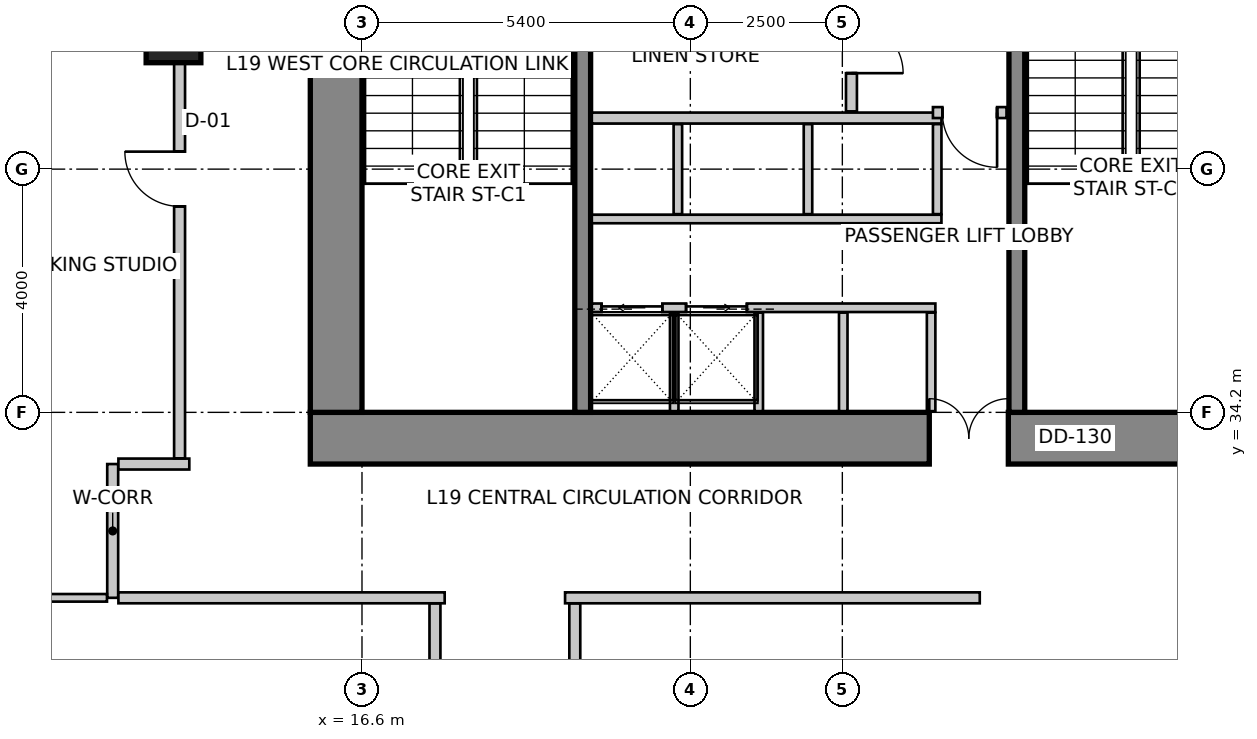
"""IFC4 building model, lengths in metres.
Left out: names, types, materials, properties, quantities, classifications, styles, units other than length and angle.
Written with IfcOpenShell. Run it as: python <this file> out.ifc"""

import sys

from ifc_helpers import new_model, si_unit, direction, frame, frame_2d, origin, origin_2d, place, context, subcontext, project, spatial, rectangle, extrude, source, transform, mapped, element, fill, save


model = new_model("IFC4")
c1 = context("Model", 3, precision=1e-05, world=origin(), true_north=direction((0.0, 1.0)))
c2 = subcontext(c1, "Body", "Model", "MODEL_VIEW")
j1 = project(units=[si_unit("LENGTHUNIT", "METRE"), si_unit("PLANEANGLEUNIT", "RADIAN")], contexts=[c1])
p1 = place(None, origin())
s1 = spatial("IfcSite", under=j1, at=p1, CompositionType="ELEMENT")
p2 = place(p1, origin())
s2 = spatial("IfcBuilding", under=s1, at=p2, CompositionType="ELEMENT")
p3 = place(p2, frame((0.0, 0.0, 79.0)))
s3 = spatial("IfcBuildingStorey", under=s2, at=p3, CompositionType="ELEMENT", Elevation=79.0)
p4 = place(p3, frame((15.75, 33.775, 0.0), z_axis=(0.0, 0.0, 1.0), x_axis=(1.0, 0.0, 0.0)))
e1 = element("IfcWall", 1, at=p4, inside=s3, PredefinedType="SHEAR", context=c2, shape_type="SweptSolid", body=[
    extrude(rectangle(XDim=16.1, YDim=0.85, at=frame_2d((8.05, 0.0))), origin(), (0.0, 0.0, 1.0), 4.0),
])
m1 = source(origin(), c2, "Body", "SweptSolid", [
    extrude(rectangle(XDim=1.3, YDim=2.15, at=frame_2d((0.65, 1.075))), frame((0.0, 0.435, 0.0), z_axis=(0.0, -1.0, 0.0), x_axis=(1.0, 0.0, 0.0)), (0.0, 0.0, 1.0), 0.87),
])
p5 = place(p4, frame((10.18, 0.0, 0.0)))
e2 = element("IfcOpeningElement", 2, at=p5, cuts=e1, PredefinedType="OPENING", context=c2, shape_type="MappedRepresentation", body=[
    mapped(m1, transform((0.0, 0.0, 0.0), scale=1.0)),
])
p6 = place(p3, frame((16.175, 34.2, 0.0), z_axis=(0.0, 0.0, 1.0), x_axis=(0.0, 1.0, 0.0)))
e3 = element("IfcWall", 3, at=p6, inside=s3, PredefinedType="SHEAR", context=c2, shape_type="SweptSolid", body=[
    extrude(rectangle(XDim=11.4, YDim=0.85, at=frame_2d((5.7, 0.0))), origin(), (0.0, 0.0, 1.0), 4.0),
])
m2 = source(origin(), c2, "Body", "SweptSolid", [
    extrude(rectangle(XDim=1.1, YDim=2.15, at=frame_2d((0.55, 1.075))), frame((0.0, 0.435, 0.0), z_axis=(0.0, -1.0, 0.0), x_axis=(1.0, 0.0, 0.0)), (0.0, 0.0, 1.0), 0.87),
])
p7 = place(p6, frame((7.15, 0.0, 0.0)))
e4 = element("IfcOpeningElement", 4, at=p7, cuts=e3, PredefinedType="OPENING", context=c2, shape_type="MappedRepresentation", body=[
    mapped(m2, transform((0.0, 0.0, 0.0), scale=1.0)),
])
p8 = place(p3, frame((20.23, 34.2, 0.0), z_axis=(0.0, 0.0, 1.0), x_axis=(0.0, 1.0, 0.0)))
e5 = element("IfcWall", 5, at=p8, inside=s3, PredefinedType="SHEAR", context=c2, shape_type="SweptSolid", body=[
    extrude(rectangle(XDim=9.06, YDim=0.26, at=frame_2d((4.53, 0.0))), origin(), (0.0, 0.0, 1.0), 4.0),
])
m3 = source(origin(), c2, "Body", "SweptSolid", [
    extrude(rectangle(XDim=1.1, YDim=2.15, at=frame_2d((0.55, 1.075))), frame((0.0, 0.14, 0.0), z_axis=(0.0, -1.0, 0.0), x_axis=(1.0, 0.0, 0.0)), (0.0, 0.0, 1.0), 0.28),
])
p9 = place(p8, frame((7.45, 0.0, 0.0)))
e6 = element("IfcOpeningElement", 6, at=p9, cuts=e5, PredefinedType="OPENING", context=c2, shape_type="MappedRepresentation", body=[
    mapped(m3, transform((0.0, 0.0, 0.0), scale=1.0)),
])
p10 = place(p3, frame((27.37, 34.2, 0.0), z_axis=(0.0, 0.0, 1.0), x_axis=(0.0, 1.0, 0.0)))
e7 = element("IfcWall", 7, at=p10, inside=s3, PredefinedType="SHEAR", context=c2, shape_type="SweptSolid", body=[
    extrude(rectangle(XDim=9.06, YDim=0.26, at=frame_2d((4.53, 0.0))), origin(), (0.0, 0.0, 1.0), 4.0),
])
p11 = place(p10, frame((7.45, 0.0, 0.0)))
e8 = element("IfcOpeningElement", 8, at=p11, cuts=e7, PredefinedType="OPENING", context=c2, shape_type="MappedRepresentation", body=[
    mapped(m3, transform((0.0, 0.0, 0.0), scale=1.0)),
])
m4 = source(origin(), c2, "Body", "SweptSolid", [
    extrude(rectangle(XDim=0.9, YDim=1.1, at=origin_2d()), origin(), (0.0, 0.0, 1.0), 4.0),
])
p12 = place(p3, frame((13.5, 40.5, 0.0), z_axis=(0.0, 0.0, 1.0), x_axis=(1.0, 0.0, 0.0)))
e9 = element("IfcColumn", 9, at=p12, inside=s3, PredefinedType="COLUMN", context=c2, shape_type="MappedRepresentation", body=[
    mapped(m4, transform((0.0, 0.0, 0.0), scale=1.0)),
])
p13 = place(p3, frame((13.269, 47.134, 0.0), z_axis=(0.0, 0.0, 1.0), x_axis=(-0.319920423265, -0.947444416722, 0.0)))
e10 = element("IfcWall", 10, at=p13, inside=s3, PredefinedType="SOLIDWALL", context=c2, shape_type="SweptSolid", body=[
    extrude(rectangle(XDim=16.135, YDim=0.3, at=frame_2d((8.067, 0.0))), origin(), (0.0, 0.0, 1.0), 3.75),
])
m5 = source(origin(), c2, "Body", "SweptSolid", [
    extrude(rectangle(XDim=2.4, YDim=2.2, at=frame_2d((1.2, 1.1))), frame((0.0, 0.16, 0.0), z_axis=(0.0, -1.0, 0.0), x_axis=(1.0, 0.0, 0.0)), (0.0, 0.0, 1.0), 0.32),
])
p14 = place(p13, frame((2.188, 0.0, 0.85)))
e11 = element("IfcOpeningElement", 11, at=p14, cuts=e10, PredefinedType="OPENING", context=c2, shape_type="MappedRepresentation", body=[
    mapped(m5, transform((0.0, 0.0, 0.0), scale=1.0)),
])
m6 = source(origin(), c2, "Body", "SweptSolid", [
    extrude(rectangle(XDim=2.8, YDim=2.4, at=frame_2d((1.4, 1.2))), frame((0.0, 0.16, 0.0), z_axis=(0.0, -1.0, 0.0), x_axis=(1.0, 0.0, 0.0)), (0.0, 0.0, 1.0), 0.32),
])
p15 = place(p13, frame((6.959, 0.0, 0.85)))
e12 = element("IfcOpeningElement", 12, at=p15, cuts=e10, PredefinedType="OPENING", context=c2, shape_type="MappedRepresentation", body=[
    mapped(m6, transform((0.0, 0.0, 0.0), scale=1.0)),
])
p16 = place(p13, frame((12.13, 0.0, 0.85)))
e13 = element("IfcOpeningElement", 13, at=p16, cuts=e10, PredefinedType="OPENING", context=c2, shape_type="MappedRepresentation", body=[
    mapped(m5, transform((0.0, 0.0, 0.0), scale=1.0)),
])
p17 = place(p3, frame((8.183, 31.833, 0.0), z_axis=(0.0, 0.0, 1.0), x_axis=(0.18216364648, -0.983268226834, 0.0)))
e14 = element("IfcWall", 14, at=p17, inside=s3, PredefinedType="SOLIDWALL", context=c2, shape_type="SweptSolid", body=[
    extrude(rectangle(XDim=26.678, YDim=0.3, at=frame_2d((13.339, 0.0))), origin(), (0.0, 0.0, 1.0), 3.75),
])
p18 = place(p17, frame((2.952, 0.0, 0.85)))
e15 = element("IfcOpeningElement", 15, at=p18, cuts=e14, PredefinedType="OPENING", context=c2, shape_type="MappedRepresentation", body=[
    mapped(m6, transform((0.0, 0.0, 0.0), scale=1.0)),
])
p19 = place(p17, frame((8.876, 0.0, 0.85)))
e16 = element("IfcOpeningElement", 16, at=p19, cuts=e14, PredefinedType="OPENING", context=c2, shape_type="MappedRepresentation", body=[
    mapped(m6, transform((0.0, 0.0, 0.0), scale=1.0)),
])
p20 = place(p17, frame((13.453, 0.0, 0.85)))
e17 = element("IfcOpeningElement", 17, at=p20, cuts=e14, PredefinedType="OPENING", context=c2, shape_type="MappedRepresentation", body=[
    mapped(m6, transform((0.0, 0.0, 0.0), scale=1.0)),
])
p21 = place(p17, frame((18.211, 0.0, 0.85)))
e18 = element("IfcOpeningElement", 18, at=p21, cuts=e14, PredefinedType="OPENING", context=c2, shape_type="MappedRepresentation", body=[
    mapped(m6, transform((0.0, 0.0, 0.0), scale=1.0)),
])
p22 = place(p17, frame((22.909, 0.0, 0.85)))
e19 = element("IfcOpeningElement", 19, at=p22, cuts=e14, PredefinedType="OPENING", context=c2, shape_type="MappedRepresentation", body=[
    mapped(m5, transform((0.0, 0.0, 0.0), scale=1.0)),
])
p23 = place(p3, frame((20.38, 35.92, 0.0), z_axis=(0.0, 0.0, 1.0), x_axis=(1.0, 0.0, 0.0)))
e20 = element("IfcWall", 20, at=p23, inside=s3, PredefinedType="SOLIDWALL", context=c2, shape_type="SweptSolid", body=[
    extrude(rectangle(XDim=5.65, YDim=0.14, at=frame_2d((2.825, 0.0))), origin(), (0.0, 0.0, 1.0), 3.75),
])
m7 = source(origin(), c2, "Body", "SweptSolid", [
    extrude(rectangle(XDim=1.0, YDim=2.15, at=frame_2d((0.5, 1.075))), frame((0.0, 0.08, 0.0), z_axis=(0.0, -1.0, 0.0), x_axis=(1.0, 0.0, 0.0)), (0.0, 0.0, 1.0), 0.16),
])
p24 = place(p23, frame((0.16, 0.0, 0.0)))
e21 = element("IfcOpeningElement", 21, at=p24, cuts=e20, PredefinedType="OPENING", context=c2, shape_type="MappedRepresentation", body=[
    mapped(m7, transform((0.0, 0.0, 0.0), scale=1.0)),
])
p25 = place(p23, frame((1.55, 0.0, 0.0)))
e22 = element("IfcOpeningElement", 22, at=p25, cuts=e20, PredefinedType="OPENING", context=c2, shape_type="MappedRepresentation", body=[
    mapped(m7, transform((0.0, 0.0, 0.0), scale=1.0)),
])
for number, where, z_axis, x_axis in (
    (23, (25.96, 34.22, 0.0), (0.0, 0.0, 1.0), (0.0, 1.0, 0.0)),
    (24, (21.735, 34.22, 0.0), (0.0, 0.0, 1.0), (0.0, 1.0, 0.0)),
    (25, (23.125, 34.22, 0.0), (0.0, 0.0, 1.0), (0.0, 1.0, 0.0)),
    (26, (24.515, 34.22, 0.0), (0.0, 0.0, 1.0), (0.0, 1.0, 0.0)),
):
    element("IfcWall", number, at=place(p3, frame(where, z_axis=z_axis, x_axis=x_axis)), inside=s3, PredefinedType="SOLIDWALL", context=c2, shape_type="SweptSolid", body=[
        extrude(rectangle(XDim=1.62, YDim=0.14, at=frame_2d((0.81, 0.0))), origin(), (0.0, 0.0, 1.0), 3.042),
    ])
p26 = place(p3, frame((20.38, 37.38, 0.0), z_axis=(0.0, 0.0, 1.0), x_axis=(1.0, 0.0, 0.0)))
e27 = element("IfcWall", 27, at=p26, inside=s3, PredefinedType="SOLIDWALL", context=c2, shape_type="SweptSolid", body=[
    extrude(rectangle(XDim=5.75, YDim=0.14, at=frame_2d((2.875, 0.0))), origin(), (0.0, 0.0, 1.0), 3.75),
])
p27 = place(p3, frame((20.38, 39.04, 0.0), z_axis=(0.0, 0.0, 1.0), x_axis=(1.0, 0.0, 0.0)))
e28 = element("IfcWall", 28, at=p27, inside=s3, PredefinedType="SOLIDWALL", context=c2, shape_type="SweptSolid", body=[
    extrude(rectangle(XDim=5.75, YDim=0.18, at=frame_2d((2.875, 0.0))), origin(), (0.0, 0.0, 1.0), 3.75),
])
for number, where, z_axis, x_axis in (
    (29, (26.06, 37.46, 0.0), (0.0, 0.0, 1.0), (0.0, 1.0, 0.0)),
    (30, (21.795, 37.46, 0.0), (0.0, 0.0, 1.0), (0.0, 1.0, 0.0)),
    (31, (23.935, 37.46, 0.0), (0.0, 0.0, 1.0), (0.0, 1.0, 0.0)),
):
    element("IfcWall", number, at=place(p3, frame(where, z_axis=z_axis, x_axis=x_axis)), inside=s3, PredefinedType="SOLIDWALL", context=c2, shape_type="SweptSolid", body=[
        extrude(rectangle(XDim=1.48, YDim=0.14, at=frame_2d((0.74, 0.0))), origin(), (0.0, 0.0, 1.0), 3.75),
    ])
p28 = place(p3, frame((24.65, 41.256, 0.0), z_axis=(0.0, 0.0, 1.0), x_axis=(0.0, -1.0, 0.0)))
e32 = element("IfcWall", 32, at=p28, inside=s3, PredefinedType="PARTITIONING", context=c2, shape_type="SweptSolid", body=[
    extrude(rectangle(XDim=2.106, YDim=0.18, at=frame_2d((1.053, 0.0))), origin(), (0.0, 0.0, 1.0), 3.75),
])
m8 = source(origin(), c2, "Body", "SweptSolid", [
    extrude(rectangle(XDim=0.85, YDim=2.15, at=frame_2d((0.425, 1.075))), frame((0.0, 0.1, 0.0), z_axis=(0.0, -1.0, 0.0), x_axis=(1.0, 0.0, 0.0)), (0.0, 0.0, 1.0), 0.2),
])
p29 = place(p28, frame((0.628, 0.0, 0.0)))
e33 = element("IfcOpeningElement", 33, at=p29, cuts=e32, PredefinedType="OPENING", context=c2, shape_type="MappedRepresentation", body=[
    mapped(m8, transform((0.0, 0.0, 0.0), scale=1.0)),
])
p30 = place(p3, frame((27.2, 39.13, 0.0), z_axis=(0.0, 0.0, 1.0), x_axis=(-1.0, 0.0, 0.0)))
e34 = element("IfcWall", 34, at=p30, inside=s3, PredefinedType="PARTITIONING", context=c2, shape_type="SweptSolid", body=[
    extrude(rectangle(XDim=1.21, YDim=0.18, at=frame_2d((0.605, 0.0))), origin(), (0.0, 0.0, 1.0), 3.75),
])
m9 = source(origin(), c2, "Body", "SweptSolid", [
    extrude(rectangle(XDim=0.9, YDim=2.15, at=frame_2d((0.45, 1.075))), frame((0.0, 0.1, 0.0), z_axis=(0.0, -1.0, 0.0), x_axis=(1.0, 0.0, 0.0)), (0.0, 0.0, 1.0), 0.2),
])
p31 = place(p30, frame((0.155, 0.0, 0.0)))
e35 = element("IfcOpeningElement", 35, at=p31, cuts=e34, PredefinedType="OPENING", context=c2, shape_type="MappedRepresentation", body=[
    mapped(m9, transform((0.0, 0.0, 0.0), scale=1.0)),
])
p32 = place(p3, frame((12.5, 31.15, 0.0), z_axis=(0.0, 0.0, 1.0), x_axis=(0.0, 1.0, 0.0)))
e36 = element("IfcWall", 36, at=p32, inside=s3, PredefinedType="PARTITIONING", context=c2, shape_type="SweptSolid", body=[
    extrude(rectangle(XDim=2.2, YDim=0.18, at=frame_2d((1.1, 0.0))), origin(), (0.0, 0.0, 1.0), 3.419),
])
p33 = place(p3, frame((12.594, 33.35, 0.0), z_axis=(0.0, 0.0, 1.0), x_axis=(1.0, 0.0, 0.0)))
e37 = element("IfcWall", 37, at=p33, inside=s3, PredefinedType="PARTITIONING", context=c2, shape_type="SweptSolid", body=[
    extrude(rectangle(XDim=1.166, YDim=0.18, at=frame_2d((0.583, 0.0))), origin(), (0.0, 0.0, 1.0), 3.75),
])
p34 = place(p3, frame((17.96, 31.15, 0.0), z_axis=(0.0, 0.0, 1.0), x_axis=(-1.0, 0.0, 0.0)))
e38 = element("IfcWall", 38, at=p34, inside=s3, PredefinedType="PARTITIONING", context=c2, shape_type="SweptSolid", body=[
    extrude(rectangle(XDim=5.366, YDim=0.18, at=frame_2d((2.683, 0.0))), origin(), (0.0, 0.0, 1.0), 3.419),
])
p35 = place(p3, frame((26.76, 31.15, 0.0), z_axis=(0.0, 0.0, 1.0), x_axis=(-1.0, 0.0, 0.0)))
e39 = element("IfcWall", 39, at=p35, inside=s3, PredefinedType="PARTITIONING", context=c2, shape_type="SweptSolid", body=[
    extrude(rectangle(XDim=6.82, YDim=0.18, at=frame_2d((3.41, 0.0))), origin(), (0.0, 0.0, 1.0), 3.419),
])
p36 = place(p3, frame((13.6, 33.444, 0.0), z_axis=(0.0, 0.0, 1.0), x_axis=(0.0, 1.0, 0.0)))
e40 = element("IfcWall", 40, at=p36, inside=s3, PredefinedType="PARTITIONING", context=c2, shape_type="SweptSolid", body=[
    extrude(rectangle(XDim=13.896, YDim=0.18, at=frame_2d((6.948, 0.0))), origin(), (0.0, 0.0, 1.0), 2.892),
])
p37 = place(p36, frame((4.144, 0.0, 0.0)))
e41 = element("IfcOpeningElement", 41, at=p37, cuts=e40, PredefinedType="OPENING", context=c2, shape_type="MappedRepresentation", body=[
    mapped(m9, transform((0.0, 0.0, 0.0), scale=1.0)),
])
p38 = place(p3, frame((12.406, 31.15, 0.0), z_axis=(0.0, 0.0, 1.0), x_axis=(-1.0, 0.0, 0.0)))
e42 = element("IfcWall", 42, at=p38, inside=s3, PredefinedType="PARTITIONING", context=c2, shape_type="SweptSolid", body=[
    extrude(rectangle(XDim=3.979, YDim=0.125, at=frame_2d((1.99, 0.0))), origin(), (0.0, 0.0, 1.0), 2.892),
])
p39 = place(p3, frame((17.8, 24.162, 0.0), z_axis=(0.0, 0.0, 1.0), x_axis=(0.0, 1.0, 0.0)))
e43 = element("IfcWall", 43, at=p39, inside=s3, PredefinedType="PARTITIONING", context=c2, shape_type="SweptSolid", body=[
    extrude(rectangle(XDim=6.894, YDim=0.18, at=frame_2d((3.447, 0.0))), origin(), (0.0, 0.0, 1.0), 3.125),
])
p40 = place(p39, frame((2.937, 0.0, 0.0)))
e44 = element("IfcOpeningElement", 44, at=p40, cuts=e43, PredefinedType="OPENING", context=c2, shape_type="MappedRepresentation", body=[
    mapped(m9, transform((0.0, 0.0, 0.0), scale=1.0)),
])
p41 = place(p3, frame((20.1, 31.056, 0.0), z_axis=(0.0, 0.0, 1.0), x_axis=(0.0, -1.0, 0.0)))
e45 = element("IfcWall", 45, at=p41, inside=s3, PredefinedType="PARTITIONING", context=c2, shape_type="SweptSolid", body=[
    extrude(rectangle(XDim=6.894, YDim=0.18, at=frame_2d((3.447, 0.0))), origin(), (0.0, 0.0, 1.0), 3.125),
])
p42 = place(p41, frame((2.937, 0.0, 0.0)))
e46 = element("IfcOpeningElement", 46, at=p42, cuts=e45, PredefinedType="OPENING", context=c2, shape_type="MappedRepresentation", body=[
    mapped(m9, transform((0.0, 0.0, 0.0), scale=1.0)),
])
m10 = source(origin(), c2, "Body", "SweptSolid", [
    extrude(rectangle(XDim=1.0, YDim=2.15, at=frame_2d((0.5, 1.075))), frame((0.0, 0.025, 0.0), z_axis=(0.0, -1.0, 0.0), x_axis=(1.0, 0.0, 0.0)), (0.0, 0.0, 1.0), 0.05),
])
p43 = place(p24, origin())
e47 = element("IfcDoor", 47, at=p43, inside=s3, OperationType="SLIDING_TO_LEFT", PredefinedType="DOOR", context=c2, shape_type="MappedRepresentation", body=[
    mapped(m10, transform((0.0, 0.0, 0.0), scale=1.0)),
])
fill(e21, e47)
p44 = place(p25, origin())
e48 = element("IfcDoor", 48, at=p44, inside=s3, OperationType="SLIDING_TO_RIGHT", PredefinedType="DOOR", context=c2, shape_type="MappedRepresentation", body=[
    mapped(m10, transform((0.0, 0.0, 0.0), scale=1.0)),
])
fill(e22, e48)
m11 = source(origin(), c2, "Body", "SweptSolid", [
    extrude(rectangle(XDim=1.3, YDim=2.15, at=frame_2d((0.65, 1.075))), frame((0.0, 0.025, 0.0), z_axis=(0.0, -1.0, 0.0), x_axis=(1.0, 0.0, 0.0)), (0.0, 0.0, 1.0), 0.05),
])
p45 = place(p5, origin())
e49 = element("IfcDoor", 49, at=p45, inside=s3, OperationType="DOUBLE_DOOR_SINGLE_SWING", PredefinedType="DOOR", context=c2, shape_type="MappedRepresentation", body=[
    mapped(m11, transform((0.0, 0.0, 0.0), scale=1.0)),
])
fill(e2, e49)
m12 = source(origin(), c2, "Body", "SweptSolid", [
    extrude(rectangle(XDim=0.85, YDim=2.15, at=frame_2d((0.425, 1.075))), frame((0.0, 0.025, 0.0), z_axis=(0.0, -1.0, 0.0), x_axis=(1.0, 0.0, 0.0)), (0.0, 0.0, 1.0), 0.05),
])
p46 = place(p29, origin())
e50 = element("IfcDoor", 50, at=p46, inside=s3, OperationType="SINGLE_SWING_RIGHT", PredefinedType="DOOR", context=c2, shape_type="MappedRepresentation", body=[
    mapped(m12, transform((0.0, 0.0, 0.0), scale=1.0)),
])
fill(e33, e50)
m13 = source(origin(), c2, "Body", "SweptSolid", [
    extrude(rectangle(XDim=0.9, YDim=2.15, at=frame_2d((0.45, 1.075))), frame((0.0, 0.025, 0.0), z_axis=(0.0, -1.0, 0.0), x_axis=(1.0, 0.0, 0.0)), (0.0, 0.0, 1.0), 0.05),
])
p47 = place(p31, origin())
e51 = element("IfcDoor", 51, at=p47, inside=s3, OperationType="SINGLE_SWING_LEFT", PredefinedType="DOOR", context=c2, shape_type="MappedRepresentation", body=[
    mapped(m13, transform((0.0, 0.0, 0.0), scale=1.0)),
])
fill(e35, e51)
m14 = source(origin(), c2, "Body", "SweptSolid", [
    extrude(rectangle(XDim=0.9, YDim=2.15, at=frame_2d((0.45, 1.075))), frame((0.0, 0.025, 0.0), z_axis=(0.0, -1.0, 0.0), x_axis=(1.0, 0.0, 0.0)), (0.0, 0.0, 1.0), 0.05),
])
p48 = place(p37, origin())
e52 = element("IfcDoor", 52, at=p48, inside=s3, OperationType="SINGLE_SWING_RIGHT", PredefinedType="DOOR", context=c2, shape_type="MappedRepresentation", body=[
    mapped(m14, transform((0.0, 0.0, 0.0), scale=1.0)),
])
fill(e41, e52)
save(model, sys.argv[1])
